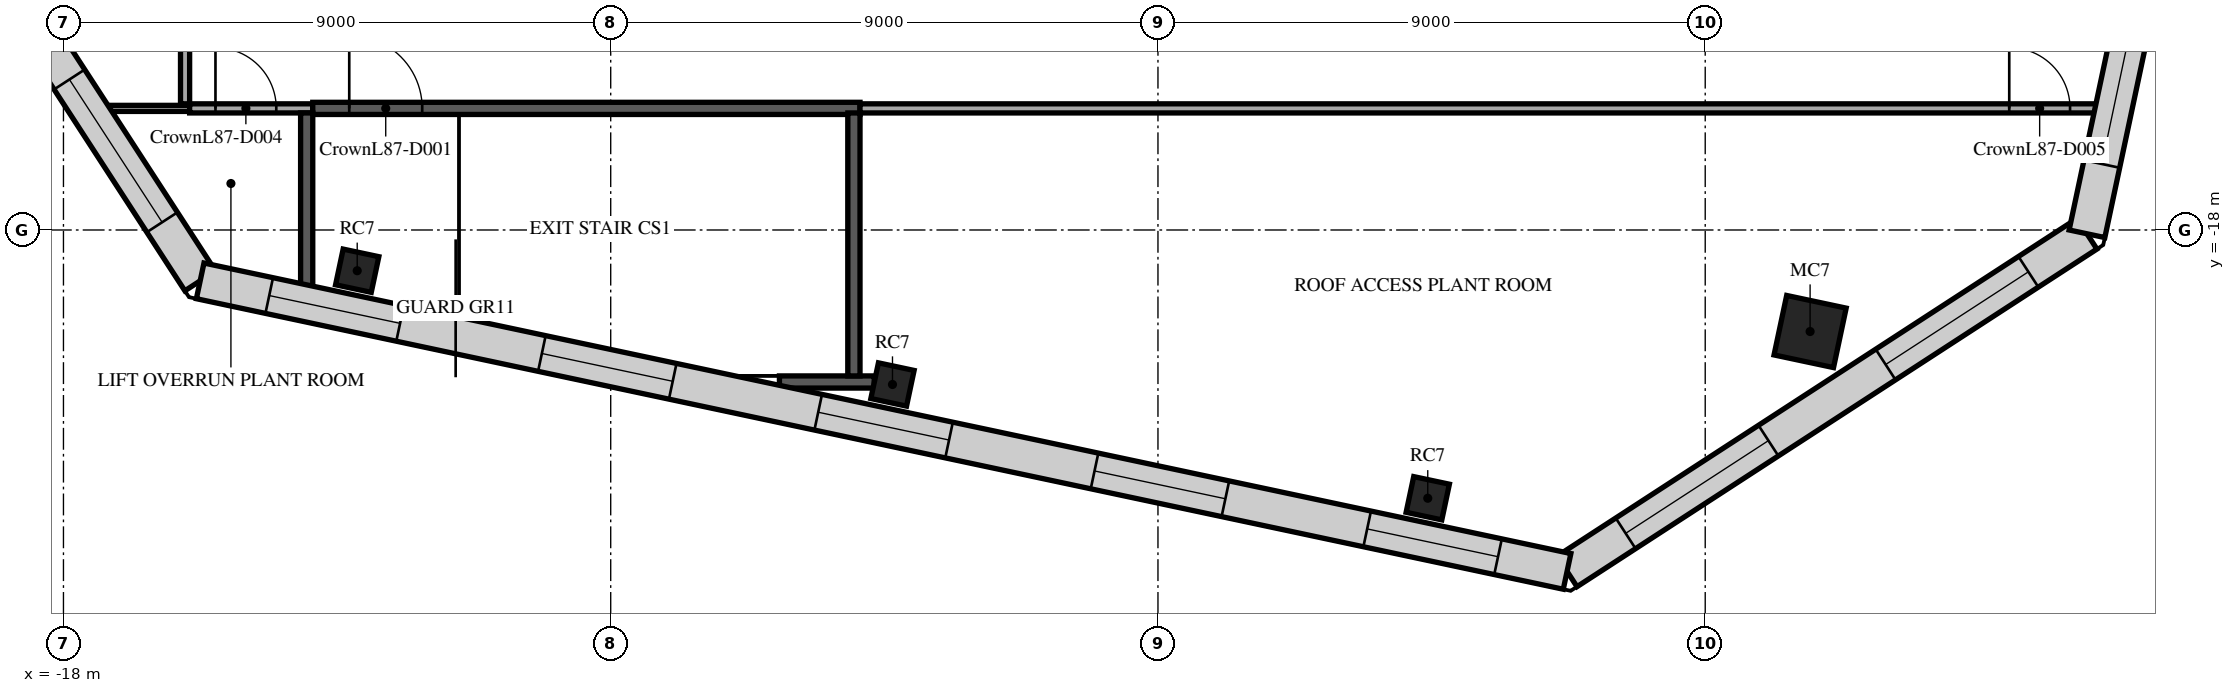
"""IFC4 building model, lengths in metres.
Left out: names, types, materials, properties, quantities, classifications, styles, units other than length and angle.
Written with IfcOpenShell. Run it as: python <this file> out.ifc"""

import sys

from ifc_helpers import new_model, si_unit, direction, frame, frame_2d, origin, origin_2d, place, context, subcontext, project, spatial, rectangle, extrude, element, fill, save


model = new_model("IFC4")
c1 = context("Model", 3, precision=1e-05, world=origin(), true_north=direction((0.0, 1.0)))
c2 = subcontext(c1, "Body", "Model", "MODEL_VIEW")
j1 = project(units=[si_unit("LENGTHUNIT", "METRE"), si_unit("PLANEANGLEUNIT", "RADIAN")], contexts=[c1])
p1 = place(None, origin())
s1 = spatial("IfcSite", under=j1, at=p1, CompositionType="ELEMENT")
p2 = place(p1, origin())
s2 = spatial("IfcBuilding", under=s1, at=p2, CompositionType="ELEMENT")
p3 = place(p2, frame((0.0, 0.0, 373.1)))
s3 = spatial("IfcBuildingStorey", under=s2, at=p3, CompositionType="ELEMENT", Elevation=373.1)
for number, where, z_axis, x_axis in (
    (1, (-13.169, -18.67, 0.0), (0.0, 0.0, 1.0), (0.208, 0.978, 0.0)),
    (2, (-4.366, -20.541, 0.0), (0.0, 0.0, 1.0), (0.208, 0.978, 0.0)),
    (3, (4.437, -22.412, 0.0), (0.0, 0.0, 1.0), (0.208, 0.978, 0.0)),
):
    element("IfcColumn", number, at=place(p3, frame(where, z_axis=z_axis, x_axis=x_axis)), inside=s3, PredefinedType="COLUMN", context=c2, shape_type="SweptSolid", body=[
        extrude(rectangle(XDim=0.6, YDim=0.6, at=origin_2d()), origin(), (0.0, 0.0, 1.0), 3.5),
    ])
p4 = place(p3, frame((10.725, -19.67, 0.0), z_axis=(0.0, 0.0, 1.0), x_axis=(0.207911690818, 0.978147600734, 0.0)))
e4 = element("IfcColumn", 4, at=p4, inside=s3, PredefinedType="COLUMN", context=c2, shape_type="SweptSolid", body=[
    extrude(rectangle(XDim=1.0, YDim=1.0, at=origin_2d()), origin(), (0.0, 0.0, 1.0), 3.5),
])
p5 = place(p3, frame((-6.225, -20.5, 0.0), z_axis=(0.0, 0.0, 1.0), x_axis=(1.0, 0.0, 0.0)))
e5 = element("IfcWall", 5, at=p5, inside=s3, PredefinedType="PARTITIONING", context=c2, shape_type="SweptSolid", body=[
    extrude(rectangle(XDim=1.559, YDim=0.2, at=frame_2d((0.78, 0.0))), origin(), (0.0, 0.0, 1.0), 3.2),
])
p6 = place(p3, frame((-17.475, -16.0, 0.0), z_axis=(0.0, 0.0, 1.0), x_axis=(1.0, 0.0, 0.0)))
e6 = element("IfcWall", 6, at=p6, inside=s3, PredefinedType="PARTITIONING", context=c2, shape_type="SweptSolid", body=[
    extrude(rectangle(XDim=1.55, YDim=0.1, at=frame_2d((0.775, 0.0))), origin(), (0.0, 0.0, 1.0), 3.2),
])
p7 = place(p3, frame((-15.925, -16.0, 0.0), z_axis=(0.0, 0.0, 1.0), x_axis=(1.0, 0.0, 0.0)))
e7 = element("IfcWall", 7, at=p7, inside=s3, PredefinedType="PARTITIONING", context=c2, shape_type="SweptSolid", body=[
    extrude(rectangle(XDim=2.025, YDim=0.15, at=frame_2d((1.013, 0.0))), origin(), (0.0, 0.0, 1.0), 3.2),
])
p8 = place(p7, frame((0.425, 0.0, 0.0)))
e8 = element("IfcOpeningElement", 8, at=p8, cuts=e7, PredefinedType="OPENING", context=c2, shape_type="SweptSolid", body=[
    extrude(rectangle(XDim=1.0, YDim=2.1, at=frame_2d((0.5, 1.05))), frame((0.0, 0.085, 0.0), z_axis=(0.0, -1.0, 0.0), x_axis=(1.0, 0.0, 0.0)), (0.0, 0.0, 1.0), 0.17),
])
p9 = place(p3, frame((-13.9, -16.0, 0.0), z_axis=(0.0, 0.0, 1.0), x_axis=(1.0, 0.0, 0.0)))
e9 = element("IfcWall", 9, at=p9, inside=s3, PredefinedType="PARTITIONING", context=c2, shape_type="SweptSolid", body=[
    extrude(rectangle(XDim=9.0, YDim=0.2, at=frame_2d((4.5, 0.0))), origin(), (0.0, 0.0, 1.0), 3.2),
])
p10 = place(p9, frame((0.6, 0.0, 0.0)))
e10 = element("IfcOpeningElement", 10, at=p10, cuts=e9, PredefinedType="OPENING", context=c2, shape_type="SweptSolid", body=[
    extrude(rectangle(XDim=1.2, YDim=2.1, at=frame_2d((0.6, 1.05))), frame((0.0, 0.11, 0.0), z_axis=(0.0, -1.0, 0.0), x_axis=(1.0, 0.0, 0.0)), (0.0, 0.0, 1.0), 0.22),
])
p11 = place(p3, frame((-4.9, -16.0, 0.0), z_axis=(0.0, 0.0, 1.0), x_axis=(1.0, 0.0, 0.0)))
e11 = element("IfcWall", 11, at=p11, inside=s3, PredefinedType="PARTITIONING", context=c2, shape_type="SweptSolid", body=[
    extrude(rectangle(XDim=20.514, YDim=0.15, at=frame_2d((10.257, 0.0))), origin(), (0.0, 0.0, 1.0), 3.2),
])
p12 = place(p11, frame((18.9, 0.0, 0.0)))
e12 = element("IfcOpeningElement", 12, at=p12, cuts=e11, PredefinedType="OPENING", context=c2, shape_type="SweptSolid", body=[
    extrude(rectangle(XDim=1.0, YDim=2.1, at=frame_2d((0.5, 1.05))), frame((0.0, 0.085, 0.0), z_axis=(0.0, -1.0, 0.0), x_axis=(1.0, 0.0, 0.0)), (0.0, 0.0, 1.0), 0.17),
])
p13 = place(p3, frame((-16.0, -15.925, 0.0), z_axis=(0.0, 0.0, 1.0), x_axis=(0.0, 1.0, 0.0)))
e13 = element("IfcWall", 13, at=p13, inside=s3, PredefinedType="PARTITIONING", context=c2, shape_type="SweptSolid", body=[
    extrude(rectangle(XDim=27.85, YDim=0.15, at=frame_2d((13.925, 0.0))), origin(), (0.0, 0.0, 1.0), 2.63),
])
p14 = place(p13, frame((15.425, 0.0, 0.0)))
e14 = element("IfcOpeningElement", 14, at=p14, cuts=e13, PredefinedType="OPENING", context=c2, shape_type="SweptSolid", body=[
    extrude(rectangle(XDim=1.0, YDim=2.1, at=frame_2d((0.5, 1.05))), frame((0.0, 0.085, 0.0), z_axis=(0.0, -1.0, 0.0), x_axis=(1.0, 0.0, 0.0)), (0.0, 0.0, 1.0), 0.17),
])
p15 = place(p3, frame((-14.0, -19.107, 0.0), z_axis=(0.0, 0.0, 1.0), x_axis=(0.0, 1.0, 0.0)))
e15 = element("IfcWall", 15, at=p15, inside=s3, PredefinedType="PARTITIONING", context=c2, shape_type="SweptSolid", body=[
    extrude(rectangle(XDim=3.032, YDim=0.2, at=frame_2d((1.516, 0.0))), origin(), (0.0, 0.0, 1.0), 2.63),
])
p16 = place(p3, frame((-5.0, -20.4, 0.0), z_axis=(0.0, 0.0, 1.0), x_axis=(0.0, 1.0, 0.0)))
e16 = element("IfcWall", 16, at=p16, inside=s3, PredefinedType="PARTITIONING", context=c2, shape_type="SweptSolid", body=[
    extrude(rectangle(XDim=4.325, YDim=0.2, at=frame_2d((2.163, 0.0))), origin(), (0.0, 0.0, 1.0), 3.2),
])
p17 = place(p3, frame((6.728, -23.615, 0.0), z_axis=(0.0, 0.0, 1.0), x_axis=(0.838665675546, 0.544646568575, 0.0)))
e17 = element("IfcWall", 17, at=p17, inside=s3, PredefinedType="STANDARD", context=c2, shape_type="SweptSolid", body=[
    extrude(rectangle(XDim=10.195, YDim=0.6, at=frame_2d((5.098, 0.0))), origin(), (0.0, 0.0, 1.0), 3.2),
])
p18 = place(p17, frame((1.149, 0.0, 0.6)))
e18 = element("IfcOpeningElement", 18, at=p18, cuts=e17, PredefinedType="OPENING", context=c2, shape_type="SweptSolid", body=[
    extrude(rectangle(XDim=2.8, YDim=1.85, at=frame_2d((1.4, 0.925))), frame((0.0, 0.31, 0.0), z_axis=(0.0, -1.0, 0.0), x_axis=(1.0, 0.0, 0.0)), (0.0, 0.0, 1.0), 0.62),
])
p19 = place(p17, frame((6.246, 0.0, 0.6)))
e19 = element("IfcOpeningElement", 19, at=p19, cuts=e17, PredefinedType="OPENING", context=c2, shape_type="SweptSolid", body=[
    extrude(rectangle(XDim=2.8, YDim=1.85, at=frame_2d((1.4, 0.925))), frame((0.0, 0.31, 0.0), z_axis=(0.0, -1.0, 0.0), x_axis=(1.0, 0.0, 0.0)), (0.0, 0.0, 1.0), 0.62),
])
p20 = place(p3, frame((15.279, -18.062, 0.0), z_axis=(0.0, 0.0, 1.0), x_axis=(0.207909936091, 0.978147973711, 0.0)))
e20 = element("IfcWall", 20, at=p20, inside=s3, PredefinedType="STANDARD", context=c2, shape_type="SweptSolid", body=[
    extrude(rectangle(XDim=28.982, YDim=0.6, at=frame_2d((14.491, 0.0))), origin(), (0.0, 0.0, 1.0), 3.2),
])
p21 = place(p20, frame((1.174, 0.0, 0.6)))
e21 = element("IfcOpeningElement", 21, at=p21, cuts=e20, PredefinedType="OPENING", context=c2, shape_type="SweptSolid", body=[
    extrude(rectangle(XDim=2.4, YDim=1.85, at=frame_2d((1.2, 0.925))), frame((0.0, 0.31, 0.0), z_axis=(0.0, -1.0, 0.0), x_axis=(1.0, 0.0, 0.0)), (0.0, 0.0, 1.0), 0.62),
])
p22 = place(p20, frame((5.983, 0.0, 0.6)))
e22 = element("IfcOpeningElement", 22, at=p22, cuts=e20, PredefinedType="OPENING", context=c2, shape_type="SweptSolid", body=[
    extrude(rectangle(XDim=2.4, YDim=1.85, at=frame_2d((1.2, 0.925))), frame((0.0, 0.31, 0.0), z_axis=(0.0, -1.0, 0.0), x_axis=(1.0, 0.0, 0.0)), (0.0, 0.0, 1.0), 0.62),
])
p23 = place(p20, frame((10.855, 0.0, 0.6)))
e23 = element("IfcOpeningElement", 23, at=p23, cuts=e20, PredefinedType="OPENING", context=c2, shape_type="SweptSolid", body=[
    extrude(rectangle(XDim=2.4, YDim=1.85, at=frame_2d((1.2, 0.925))), frame((0.0, 0.31, 0.0), z_axis=(0.0, -1.0, 0.0), x_axis=(1.0, 0.0, 0.0)), (0.0, 0.0, 1.0), 0.62),
])
p24 = place(p20, frame((15.727, 0.0, 0.6)))
e24 = element("IfcOpeningElement", 24, at=p24, cuts=e20, PredefinedType="OPENING", context=c2, shape_type="SweptSolid", body=[
    extrude(rectangle(XDim=2.4, YDim=1.85, at=frame_2d((1.2, 0.925))), frame((0.0, 0.31, 0.0), z_axis=(0.0, -1.0, 0.0), x_axis=(1.0, 0.0, 0.0)), (0.0, 0.0, 1.0), 0.62),
])
p25 = place(p20, frame((20.599, 0.0, 0.6)))
e25 = element("IfcOpeningElement", 25, at=p25, cuts=e20, PredefinedType="OPENING", context=c2, shape_type="SweptSolid", body=[
    extrude(rectangle(XDim=2.4, YDim=1.85, at=frame_2d((1.2, 0.925))), frame((0.0, 0.31, 0.0), z_axis=(0.0, -1.0, 0.0), x_axis=(1.0, 0.0, 0.0)), (0.0, 0.0, 1.0), 0.62),
])
p26 = place(p20, frame((25.408, 0.0, 0.6)))
e26 = element("IfcOpeningElement", 26, at=p26, cuts=e20, PredefinedType="OPENING", context=c2, shape_type="SweptSolid", body=[
    extrude(rectangle(XDim=2.4, YDim=1.85, at=frame_2d((1.2, 0.925))), frame((0.0, 0.31, 0.0), z_axis=(0.0, -1.0, 0.0), x_axis=(1.0, 0.0, 0.0)), (0.0, 0.0, 1.0), 0.62),
])
p27 = place(p3, frame((-21.304, -10.286, 0.0), z_axis=(0.0, 0.0, 1.0), x_axis=(0.544646568575, -0.838665675546, 0.0)))
e27 = element("IfcWall", 27, at=p27, inside=s3, PredefinedType="STANDARD", context=c2, shape_type="SweptSolid", body=[
    extrude(rectangle(XDim=10.195, YDim=0.6, at=frame_2d((5.098, 0.0))), origin(), (0.0, 0.0, 1.0), 3.2),
])
p28 = place(p27, frame((1.149, 0.0, 0.6)))
e28 = element("IfcOpeningElement", 28, at=p28, cuts=e27, PredefinedType="OPENING", context=c2, shape_type="SweptSolid", body=[
    extrude(rectangle(XDim=2.8, YDim=1.85, at=frame_2d((1.4, 0.925))), frame((0.0, 0.31, 0.0), z_axis=(0.0, -1.0, 0.0), x_axis=(1.0, 0.0, 0.0)), (0.0, 0.0, 1.0), 0.62),
])
p29 = place(p27, frame((6.246, 0.0, 0.6)))
e29 = element("IfcOpeningElement", 29, at=p29, cuts=e27, PredefinedType="OPENING", context=c2, shape_type="SweptSolid", body=[
    extrude(rectangle(XDim=2.8, YDim=1.85, at=frame_2d((1.4, 0.925))), frame((0.0, 0.31, 0.0), z_axis=(0.0, -1.0, 0.0), x_axis=(1.0, 0.0, 0.0)), (0.0, 0.0, 1.0), 0.62),
])
p30 = place(p3, frame((-15.751, -18.837, 0.0), z_axis=(0.0, 0.0, 1.0), x_axis=(0.978146672891, -0.207916055929, 0.0)))
e30 = element("IfcWall", 30, at=p30, inside=s3, PredefinedType="STANDARD", context=c2, shape_type="SweptSolid", body=[
    extrude(rectangle(XDim=22.982, YDim=0.6, at=frame_2d((11.491, 0.0))), origin(), (0.0, 0.0, 1.0), 3.2),
])
p31 = place(p30, frame((1.161, 0.0, 0.6)))
e31 = element("IfcOpeningElement", 31, at=p31, cuts=e30, PredefinedType="OPENING", context=c2, shape_type="SweptSolid", body=[
    extrude(rectangle(XDim=2.2, YDim=1.85, at=frame_2d((1.1, 0.925))), frame((0.0, 0.31, 0.0), z_axis=(0.0, -1.0, 0.0), x_axis=(1.0, 0.0, 0.0)), (0.0, 0.0, 1.0), 0.62),
])
p32 = place(p30, frame((5.745, 0.0, 0.6)))
e32 = element("IfcOpeningElement", 32, at=p32, cuts=e30, PredefinedType="OPENING", context=c2, shape_type="SweptSolid", body=[
    extrude(rectangle(XDim=2.2, YDim=1.85, at=frame_2d((1.1, 0.925))), frame((0.0, 0.31, 0.0), z_axis=(0.0, -1.0, 0.0), x_axis=(1.0, 0.0, 0.0)), (0.0, 0.0, 1.0), 0.62),
])
p33 = place(p30, frame((10.391, 0.0, 0.6)))
e33 = element("IfcOpeningElement", 33, at=p33, cuts=e30, PredefinedType="OPENING", context=c2, shape_type="SweptSolid", body=[
    extrude(rectangle(XDim=2.2, YDim=1.85, at=frame_2d((1.1, 0.925))), frame((0.0, 0.31, 0.0), z_axis=(0.0, -1.0, 0.0), x_axis=(1.0, 0.0, 0.0)), (0.0, 0.0, 1.0), 0.62),
])
p34 = place(p30, frame((15.037, 0.0, 0.6)))
e34 = element("IfcOpeningElement", 34, at=p34, cuts=e30, PredefinedType="OPENING", context=c2, shape_type="SweptSolid", body=[
    extrude(rectangle(XDim=2.2, YDim=1.85, at=frame_2d((1.1, 0.925))), frame((0.0, 0.31, 0.0), z_axis=(0.0, -1.0, 0.0), x_axis=(1.0, 0.0, 0.0)), (0.0, 0.0, 1.0), 0.62),
])
p35 = place(p30, frame((19.621, 0.0, 0.6)))
e35 = element("IfcOpeningElement", 35, at=p35, cuts=e30, PredefinedType="OPENING", context=c2, shape_type="SweptSolid", body=[
    extrude(rectangle(XDim=2.2, YDim=1.85, at=frame_2d((1.1, 0.925))), frame((0.0, 0.31, 0.0), z_axis=(0.0, -1.0, 0.0), x_axis=(1.0, 0.0, 0.0)), (0.0, 0.0, 1.0), 0.62),
])
p36 = place(p10, frame((1.2, 0.0, 0.0), z_axis=(0.0, 0.0, 1.0), x_axis=(-1.0, 0.0, 0.0)))
e36 = element("IfcDoor", 36, at=p36, inside=s3, OperationType="SINGLE_SWING_LEFT", PredefinedType="DOOR", context=c2, shape_type="SweptSolid", body=[
    extrude(rectangle(XDim=1.2, YDim=2.1, at=frame_2d((0.6, 1.05))), frame((0.0, 0.025, 0.0), z_axis=(0.0, -1.0, 0.0), x_axis=(1.0, 0.0, 0.0)), (0.0, 0.0, 1.0), 0.05),
])
fill(e10, e36)
p37 = place(p8, origin())
e37 = element("IfcDoor", 37, at=p37, inside=s3, OperationType="SINGLE_SWING_RIGHT", PredefinedType="DOOR", context=c2, shape_type="SweptSolid", body=[
    extrude(rectangle(XDim=1.0, YDim=2.1, at=frame_2d((0.5, 1.05))), frame((0.0, 0.025, 0.0), z_axis=(0.0, -1.0, 0.0), x_axis=(1.0, 0.0, 0.0)), (0.0, 0.0, 1.0), 0.05),
])
fill(e8, e37)
p38 = place(p12, origin())
e38 = element("IfcDoor", 38, at=p38, inside=s3, OperationType="SINGLE_SWING_LEFT", PredefinedType="DOOR", context=c2, shape_type="SweptSolid", body=[
    extrude(rectangle(XDim=1.0, YDim=2.1, at=frame_2d((0.5, 1.05))), frame((0.0, 0.025, 0.0), z_axis=(0.0, -1.0, 0.0), x_axis=(1.0, 0.0, 0.0)), (0.0, 0.0, 1.0), 0.05),
])
fill(e12, e38)
p39 = place(p18, origin())
e39 = element("IfcWindow", 39, at=p39, inside=s3, PartitioningType="SINGLE_PANEL", PredefinedType="USERDEFINED", context=c2, shape_type="SweptSolid", body=[
    extrude(rectangle(XDim=2.8, YDim=1.85, at=frame_2d((1.4, 0.925))), frame((0.0, 0.03, 0.0), z_axis=(0.0, -1.0, 0.0), x_axis=(1.0, 0.0, 0.0)), (0.0, 0.0, 1.0), 0.06),
])
fill(e18, e39)
p40 = place(p19, origin())
e40 = element("IfcWindow", 40, at=p40, inside=s3, PartitioningType="SINGLE_PANEL", PredefinedType="USERDEFINED", context=c2, shape_type="SweptSolid", body=[
    extrude(rectangle(XDim=2.8, YDim=1.85, at=frame_2d((1.4, 0.925))), frame((0.0, 0.03, 0.0), z_axis=(0.0, -1.0, 0.0), x_axis=(1.0, 0.0, 0.0)), (0.0, 0.0, 1.0), 0.06),
])
fill(e19, e40)
p41 = place(p21, origin())
e41 = element("IfcWindow", 41, at=p41, inside=s3, PartitioningType="SINGLE_PANEL", PredefinedType="USERDEFINED", context=c2, shape_type="SweptSolid", body=[
    extrude(rectangle(XDim=2.4, YDim=1.85, at=frame_2d((1.2, 0.925))), frame((0.0, 0.03, 0.0), z_axis=(0.0, -1.0, 0.0), x_axis=(1.0, 0.0, 0.0)), (0.0, 0.0, 1.0), 0.06),
])
fill(e21, e41)
p42 = place(p29, origin())
e42 = element("IfcWindow", 42, at=p42, inside=s3, PartitioningType="SINGLE_PANEL", PredefinedType="USERDEFINED", context=c2, shape_type="SweptSolid", body=[
    extrude(rectangle(XDim=2.8, YDim=1.85, at=frame_2d((1.4, 0.925))), frame((0.0, 0.03, 0.0), z_axis=(0.0, -1.0, 0.0), x_axis=(1.0, 0.0, 0.0)), (0.0, 0.0, 1.0), 0.06),
])
fill(e29, e42)
p43 = place(p31, origin())
e43 = element("IfcWindow", 43, at=p43, inside=s3, PartitioningType="SINGLE_PANEL", PredefinedType="USERDEFINED", context=c2, shape_type="SweptSolid", body=[
    extrude(rectangle(XDim=2.2, YDim=1.85, at=frame_2d((1.1, 0.925))), frame((0.0, 0.03, 0.0), z_axis=(0.0, -1.0, 0.0), x_axis=(1.0, 0.0, 0.0)), (0.0, 0.0, 1.0), 0.06),
])
fill(e31, e43)
p44 = place(p32, origin())
e44 = element("IfcWindow", 44, at=p44, inside=s3, PartitioningType="SINGLE_PANEL", PredefinedType="USERDEFINED", context=c2, shape_type="SweptSolid", body=[
    extrude(rectangle(XDim=2.2, YDim=1.85, at=frame_2d((1.1, 0.925))), frame((0.0, 0.03, 0.0), z_axis=(0.0, -1.0, 0.0), x_axis=(1.0, 0.0, 0.0)), (0.0, 0.0, 1.0), 0.06),
])
fill(e32, e44)
p45 = place(p33, origin())
e45 = element("IfcWindow", 45, at=p45, inside=s3, PartitioningType="SINGLE_PANEL", PredefinedType="USERDEFINED", context=c2, shape_type="SweptSolid", body=[
    extrude(rectangle(XDim=2.2, YDim=1.85, at=frame_2d((1.1, 0.925))), frame((0.0, 0.03, 0.0), z_axis=(0.0, -1.0, 0.0), x_axis=(1.0, 0.0, 0.0)), (0.0, 0.0, 1.0), 0.06),
])
fill(e33, e45)
p46 = place(p34, origin())
e46 = element("IfcWindow", 46, at=p46, inside=s3, PartitioningType="SINGLE_PANEL", PredefinedType="USERDEFINED", context=c2, shape_type="SweptSolid", body=[
    extrude(rectangle(XDim=2.2, YDim=1.85, at=frame_2d((1.1, 0.925))), frame((0.0, 0.03, 0.0), z_axis=(0.0, -1.0, 0.0), x_axis=(1.0, 0.0, 0.0)), (0.0, 0.0, 1.0), 0.06),
])
fill(e34, e46)
p47 = place(p35, origin())
e47 = element("IfcWindow", 47, at=p47, inside=s3, PartitioningType="SINGLE_PANEL", PredefinedType="USERDEFINED", context=c2, shape_type="SweptSolid", body=[
    extrude(rectangle(XDim=2.2, YDim=1.85, at=frame_2d((1.1, 0.925))), frame((0.0, 0.03, 0.0), z_axis=(0.0, -1.0, 0.0), x_axis=(1.0, 0.0, 0.0)), (0.0, 0.0, 1.0), 0.06),
])
fill(e35, e47)
save(model, sys.argv[1])
